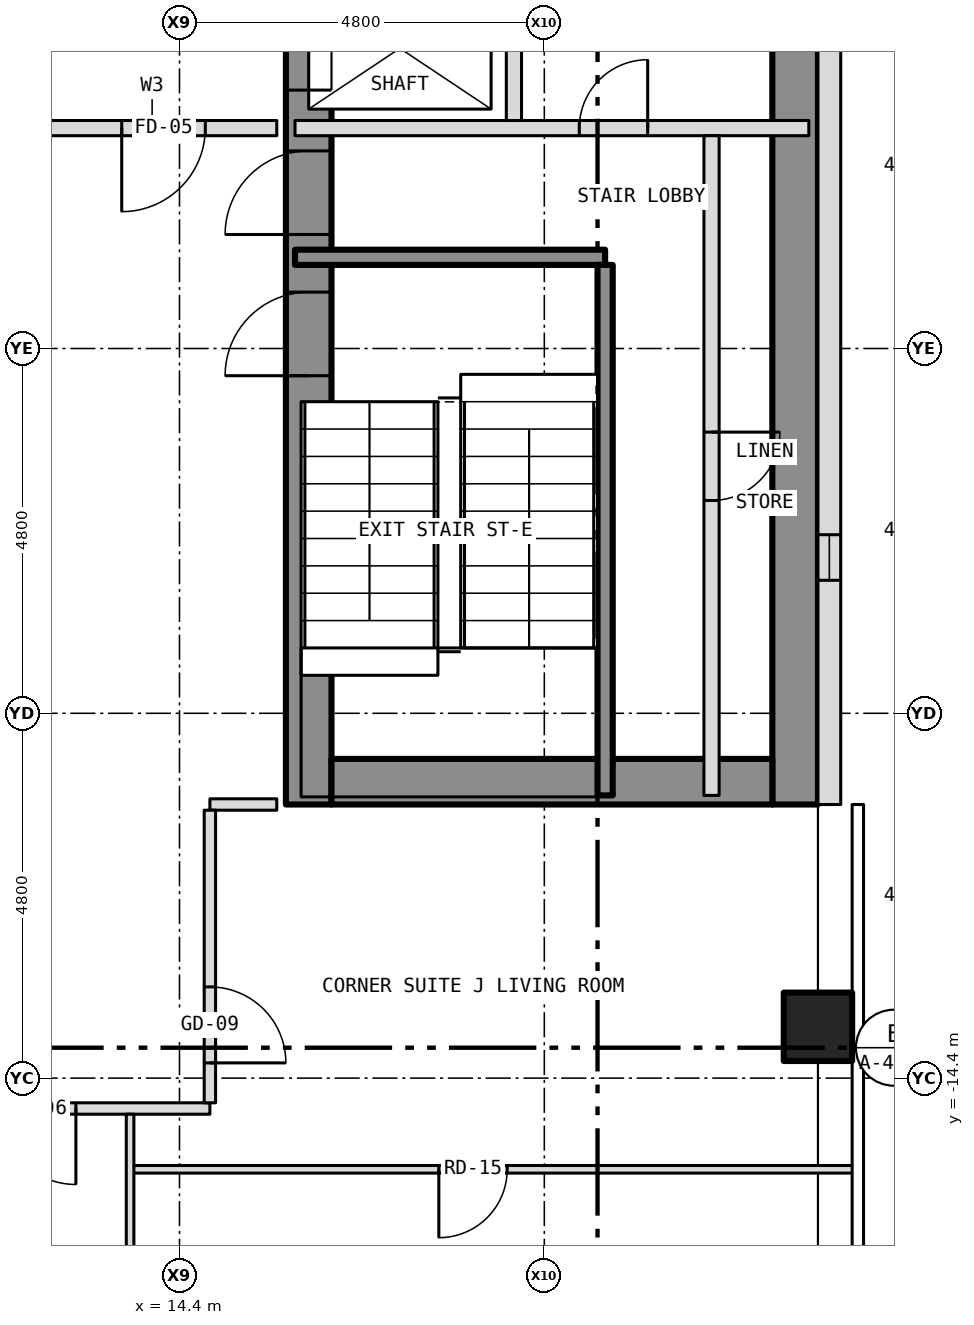
"""IFC4 building model, lengths in metres.
Left out: names, types, materials, properties, quantities, classifications, styles, units other than length and angle.
Written with IfcOpenShell. Run it as: python <this file> out.ifc"""

import sys

from ifc_helpers import new_model, si_unit, direction, frame, frame_2d, origin, origin_2d, place, context, subcontext, project, spatial, rectangle, hollow_rectangle, extrude, element, fill, save


model = new_model("IFC4")
c1 = context("Model", 3, precision=1e-05, world=origin(), true_north=direction((0.0, 1.0)))
c2 = subcontext(c1, "Body", "Model", "MODEL_VIEW")
j1 = project(units=[si_unit("LENGTHUNIT", "METRE"), si_unit("PLANEANGLEUNIT", "RADIAN")], contexts=[c1])
p1 = place(None, origin())
s1 = spatial("IfcSite", under=j1, at=p1, CompositionType="ELEMENT")
p2 = place(p1, origin())
s2 = spatial("IfcBuilding", under=s1, at=p2, CompositionType="ELEMENT")
p3 = place(p2, frame((0.0, 0.0, 99.5)))
s3 = spatial("IfcBuildingStorey", under=s2, at=p3, CompositionType="ELEMENT", Elevation=99.5)
p4 = place(p3, frame((22.8, -13.725, -0.15), z_axis=(0.0, 0.0, 1.0), x_axis=(1.0, 0.0, 0.0)))
e1 = element("IfcColumn", 1, at=p4, inside=s3, PredefinedType="COLUMN", context=c2, shape_type="SweptSolid", body=[
    extrude(hollow_rectangle(XDim=0.9, YDim=0.9, WallThickness=0.05, at=origin_2d()), origin(), (0.0, 0.0, 1.0), 3.5),
])
p5 = place(p3, frame((16.1, -10.8, 0.0), z_axis=(0.0, 0.0, 1.0), x_axis=(0.0, 1.0, 0.0)))
e2 = element("IfcWall", 2, at=p5, inside=s3, PredefinedType="SHEAR", context=c2, shape_type="SweptSolid", body=[
    extrude(rectangle(XDim=21.6, YDim=0.6, at=frame_2d((10.8, 0.0))), origin(), (0.0, 0.0, 1.0), 3.25),
])
p6 = place(p5, frame((9.4, 0.0, 0.0)))
e3 = element("IfcOpeningElement", 3, at=p6, cuts=e2, PredefinedType="OPENING", context=c2, shape_type="SweptSolid", body=[
    extrude(rectangle(XDim=1.1, YDim=2.1, at=frame_2d((0.55, 1.05))), frame((0.0, 0.312, 0.0), z_axis=(0.0, -1.0, 0.0), x_axis=(1.0, 0.0, 0.0)), (0.0, 0.0, 1.0), 0.624),
])
p7 = place(p5, frame((11.5, 0.0, 0.0)))
e4 = element("IfcOpeningElement", 4, at=p7, cuts=e2, PredefinedType="OPENING", context=c2, shape_type="SweptSolid", body=[
    extrude(rectangle(XDim=1.1, YDim=2.1, at=frame_2d((0.55, 1.05))), frame((0.0, 0.312, 0.0), z_axis=(0.0, -1.0, 0.0), x_axis=(1.0, 0.0, 0.0)), (0.0, 0.0, 1.0), 0.624),
])
p8 = place(p5, frame((13.6, 0.0, 0.0)))
e5 = element("IfcOpeningElement", 5, at=p8, cuts=e2, PredefinedType="OPENING", context=c2, shape_type="SweptSolid", body=[
    extrude(rectangle(XDim=1.1, YDim=2.1, at=frame_2d((0.55, 1.05))), frame((0.0, 0.312, 0.0), z_axis=(0.0, -1.0, 0.0), x_axis=(1.0, 0.0, 0.0)), (0.0, 0.0, 1.0), 0.624),
])
p9 = place(p5, frame((15.7, 0.0, 0.0)))
e6 = element("IfcOpeningElement", 6, at=p9, cuts=e2, PredefinedType="OPENING", context=c2, shape_type="SweptSolid", body=[
    extrude(rectangle(XDim=1.1, YDim=2.1, at=frame_2d((0.55, 1.05))), frame((0.0, 0.312, 0.0), z_axis=(0.0, -1.0, 0.0), x_axis=(1.0, 0.0, 0.0)), (0.0, 0.0, 1.0), 0.624),
])
p10 = place(p5, frame((17.8, 0.0, 0.0)))
e7 = element("IfcOpeningElement", 7, at=p10, cuts=e2, PredefinedType="OPENING", context=c2, shape_type="SweptSolid", body=[
    extrude(rectangle(XDim=1.1, YDim=2.1, at=frame_2d((0.55, 1.05))), frame((0.0, 0.312, 0.0), z_axis=(0.0, -1.0, 0.0), x_axis=(1.0, 0.0, 0.0)), (0.0, 0.0, 1.0), 0.624),
])
p11 = place(p5, frame((5.642, 0.0, 0.0)))
e8 = element("IfcOpeningElement", 8, at=p11, cuts=e2, PredefinedType="OPENING", context=c2, shape_type="SweptSolid", body=[
    extrude(rectangle(XDim=1.1, YDim=2.1, at=frame_2d((0.55, 1.05))), frame((0.0, 0.312, 0.0), z_axis=(0.0, -1.0, 0.0), x_axis=(1.0, 0.0, 0.0)), (0.0, 0.0, 1.0), 0.624),
])
p12 = place(p5, frame((7.5, 0.0, 0.0)))
e9 = element("IfcOpeningElement", 9, at=p12, cuts=e2, PredefinedType="OPENING", context=c2, shape_type="SweptSolid", body=[
    extrude(rectangle(XDim=1.1, YDim=2.1, at=frame_2d((0.55, 1.05))), frame((0.0, 0.312, 0.0), z_axis=(0.0, -1.0, 0.0), x_axis=(1.0, 0.0, 0.0)), (0.0, 0.0, 1.0), 0.624),
])
p13 = place(p3, frame((22.5, -10.8, 0.0), z_axis=(0.0, 0.0, 1.0), x_axis=(0.0, 1.0, 0.0)))
e10 = element("IfcWall", 10, at=p13, inside=s3, PredefinedType="SHEAR", context=c2, shape_type="SweptSolid", body=[
    extrude(rectangle(XDim=21.6, YDim=0.6, at=frame_2d((10.8, 0.0))), origin(), (0.0, 0.0, 1.0), 3.25),
])
p14 = place(p3, frame((16.4, -10.5, 0.0), z_axis=(0.0, 0.0, 1.0), x_axis=(1.0, 0.0, 0.0)))
e11 = element("IfcWall", 11, at=p14, inside=s3, PredefinedType="SHEAR", context=c2, shape_type="SweptSolid", body=[
    extrude(rectangle(XDim=5.8, YDim=0.6, at=frame_2d((2.9, 0.0))), origin(), (0.0, 0.0, 1.0), 3.25),
])
p15 = place(p3, frame((22.95, -10.8, 0.0), z_axis=(0.0, 0.0, 1.0), x_axis=(0.0, 1.0, 0.0)))
e12 = element("IfcWall", 12, at=p15, inside=s3, PredefinedType="SOLIDWALL", context=c2, shape_type="SweptSolid", body=[
    extrude(rectangle(XDim=21.6, YDim=0.3, at=frame_2d((10.8, 0.0))), origin(), (0.0, 0.0, 1.0), 3.5),
])
p16 = place(p15, frame((2.95, 0.0, 1.0)))
e13 = element("IfcOpeningElement", 13, at=p16, cuts=e12, PredefinedType="OPENING", context=c2, shape_type="SweptSolid", body=[
    extrude(rectangle(XDim=0.6, YDim=1.5, at=frame_2d((0.3, 0.75))), frame((0.0, 0.162, 0.0), z_axis=(0.0, -1.0, 0.0), x_axis=(1.0, 0.0, 0.0)), (0.0, 0.0, 1.0), 0.324),
])
p17 = place(p3, frame((13.75, -15.6, 0.0), z_axis=(0.0, 0.0, 1.0), x_axis=(1.0, 0.0, 0.0)))
e14 = element("IfcWall", 14, at=p17, inside=s3, PredefinedType="PARTITIONING", context=c2, shape_type="SweptSolid", body=[
    extrude(rectangle(XDim=9.53, YDim=0.1, at=frame_2d((4.765, 0.0))), origin(), (0.0, 0.0, 1.0), 3.35),
])
p18 = place(p17, frame((4.062, 0.0, 0.0)))
e15 = element("IfcOpeningElement", 15, at=p18, cuts=e14, PredefinedType="OPENING", context=c2, shape_type="SweptSolid", body=[
    extrude(rectangle(XDim=0.9, YDim=2.1, at=frame_2d((0.45, 1.05))), frame((0.0, 0.062, 0.0), z_axis=(0.0, -1.0, 0.0), x_axis=(1.0, 0.0, 0.0)), (0.0, 0.0, 1.0), 0.124),
])
p19 = place(p3, frame((-14.8, -14.8, 0.0), z_axis=(0.0, 0.0, 1.0), x_axis=(1.0, 0.0, 0.0)))
e16 = element("IfcWall", 16, at=p19, inside=s3, PredefinedType="PARTITIONING", context=c2, shape_type="SweptSolid", body=[
    extrude(rectangle(XDim=29.6, YDim=0.15, at=frame_2d((14.8, 0.0))), origin(), (0.0, 0.0, 1.0), 3.35),
])
p20 = place(p19, frame((2.634, 0.0, 0.0)))
e17 = element("IfcOpeningElement", 17, at=p20, cuts=e16, PredefinedType="OPENING", context=c2, shape_type="SweptSolid", body=[
    extrude(rectangle(XDim=1.0, YDim=2.1, at=frame_2d((0.5, 1.05))), frame((0.0, 0.087, 0.0), z_axis=(0.0, -1.0, 0.0), x_axis=(1.0, 0.0, 0.0)), (0.0, 0.0, 1.0), 0.174),
])
p21 = place(p19, frame((16.816, 0.0, 0.0)))
e18 = element("IfcOpeningElement", 18, at=p21, cuts=e16, PredefinedType="OPENING", context=c2, shape_type="SweptSolid", body=[
    extrude(rectangle(XDim=1.0, YDim=2.1, at=frame_2d((0.5, 1.05))), frame((0.0, 0.087, 0.0), z_axis=(0.0, -1.0, 0.0), x_axis=(1.0, 0.0, 0.0)), (0.0, 0.0, 1.0), 0.174),
])
p22 = place(p19, frame((22.263, 0.0, 0.0)))
e19 = element("IfcOpeningElement", 19, at=p22, cuts=e16, PredefinedType="OPENING", context=c2, shape_type="SweptSolid", body=[
    extrude(rectangle(XDim=1.0, YDim=2.1, at=frame_2d((0.5, 1.05))), frame((0.0, 0.087, 0.0), z_axis=(0.0, -1.0, 0.0), x_axis=(1.0, 0.0, 0.0)), (0.0, 0.0, 1.0), 0.174),
])
p23 = place(p19, frame((26.837, 0.0, 0.0)))
e20 = element("IfcOpeningElement", 20, at=p23, cuts=e16, PredefinedType="OPENING", context=c2, shape_type="SweptSolid", body=[
    extrude(rectangle(XDim=1.0, YDim=2.1, at=frame_2d((0.5, 1.05))), frame((0.0, 0.087, 0.0), z_axis=(0.0, -1.0, 0.0), x_axis=(1.0, 0.0, 0.0)), (0.0, 0.0, 1.0), 0.174),
])
p24 = place(p3, frame((14.8, -10.8, 0.0), z_axis=(0.0, 0.0, 1.0), x_axis=(1.0, 0.0, 0.0)))
e21 = element("IfcWall", 21, at=p24, inside=s3, PredefinedType="PARTITIONING", context=c2, shape_type="SweptSolid", body=[
    extrude(rectangle(XDim=0.88, YDim=0.15, at=frame_2d((0.44, 0.0))), origin(), (0.0, 0.0, 1.0), 3.35),
])
p25 = place(p3, frame((15.92, -3.6, 0.0), z_axis=(0.0, 0.0, 1.0), x_axis=(1.0, 0.0, 0.0)))
e22 = element("IfcWall", 22, at=p25, inside=s3, PredefinedType="SHEAR", context=c2, shape_type="SweptSolid", body=[
    extrude(rectangle(XDim=4.08, YDim=0.2, at=frame_2d((2.04, 0.0))), origin(), (0.0, 0.0, 1.0), 3.25),
])
p26 = place(p3, frame((12.4, -1.9, 0.0), z_axis=(0.0, 0.0, 1.0), x_axis=(1.0, 0.0, 0.0)))
e23 = element("IfcWall", 23, at=p26, inside=s3, PredefinedType="PARTITIONING", context=c2, shape_type="SweptSolid", body=[
    extrude(rectangle(XDim=3.28, YDim=0.2, at=frame_2d((1.64, 0.0))), origin(), (0.0, 0.0, 1.0), 3.35),
])
p27 = place(p26, frame((1.24, 0.0, 0.0)))
e24 = element("IfcOpeningElement", 24, at=p27, cuts=e23, PredefinedType="OPENING", context=c2, shape_type="SweptSolid", body=[
    extrude(rectangle(XDim=1.1, YDim=2.1, at=frame_2d((0.55, 1.05))), frame((0.0, 0.112, 0.0), z_axis=(0.0, -1.0, 0.0), x_axis=(1.0, 0.0, 0.0)), (0.0, 0.0, 1.0), 0.224),
])
p28 = place(p3, frame((15.92, -1.9, 0.0), z_axis=(0.0, 0.0, 1.0), x_axis=(1.0, 0.0, 0.0)))
e25 = element("IfcWall", 25, at=p28, inside=s3, PredefinedType="PARTITIONING", context=c2, shape_type="SweptSolid", body=[
    extrude(rectangle(XDim=6.76, YDim=0.2, at=frame_2d((3.38, 0.0))), origin(), (0.0, 0.0, 1.0), 3.25),
])
p29 = place(p28, frame((3.74, 0.0, 0.0)))
e26 = element("IfcOpeningElement", 26, at=p29, cuts=e25, PredefinedType="OPENING", context=c2, shape_type="SweptSolid", body=[
    extrude(rectangle(XDim=0.9, YDim=2.1, at=frame_2d((0.45, 1.05))), frame((0.0, 0.112, 0.0), z_axis=(0.0, -1.0, 0.0), x_axis=(1.0, 0.0, 0.0)), (0.0, 0.0, 1.0), 0.224),
])
p30 = place(p3, frame((13.75, -22.68, 0.0), z_axis=(0.0, 0.0, 1.0), x_axis=(0.0, 1.0, 0.0)))
e27 = element("IfcWall", 27, at=p30, inside=s3, PredefinedType="PARTITIONING", context=c2, shape_type="SweptSolid", body=[
    extrude(rectangle(XDim=7.805, YDim=0.1, at=frame_2d((3.902, 0.0))), origin(), (0.0, 0.0, 1.0), 3.35),
])
p31 = place(p3, frame((14.8, -14.725, 0.0), z_axis=(0.0, 0.0, 1.0), x_axis=(0.0, 1.0, 0.0)))
e28 = element("IfcWall", 28, at=p31, inside=s3, PredefinedType="PARTITIONING", context=c2, shape_type="SweptSolid", body=[
    extrude(rectangle(XDim=3.85, YDim=0.15, at=frame_2d((1.925, 0.0))), origin(), (0.0, 0.0, 1.0), 3.35),
])
p32 = place(p31, frame((0.525, 0.0, 0.0)))
e29 = element("IfcOpeningElement", 29, at=p32, cuts=e28, PredefinedType="OPENING", context=c2, shape_type="SweptSolid", body=[
    extrude(rectangle(XDim=1.0, YDim=2.1, at=frame_2d((0.5, 1.05))), frame((0.0, 0.087, 0.0), z_axis=(0.0, -1.0, 0.0), x_axis=(1.0, 0.0, 0.0)), (0.0, 0.0, 1.0), 0.174),
])
p33 = place(p3, frame((18.8, -1.8, 0.0), z_axis=(0.0, 0.0, 1.0), x_axis=(0.0, 1.0, 0.0)))
e30 = element("IfcWall", 30, at=p33, inside=s3, PredefinedType="PARTITIONING", context=c2, shape_type="SweptSolid", body=[
    extrude(rectangle(XDim=4.0, YDim=0.2, at=frame_2d((2.0, 0.0))), origin(), (0.0, 0.0, 1.0), 3.25),
])
p34 = place(p3, frame((20.0, -10.68, 0.0), z_axis=(0.0, 0.0, 1.0), x_axis=(0.0, 1.0, 0.0)))
e31 = element("IfcWall", 31, at=p34, inside=s3, PredefinedType="SHEAR", context=c2, shape_type="SweptSolid", body=[
    extrude(rectangle(XDim=6.98, YDim=0.2, at=frame_2d((3.49, 0.0))), origin(), (0.0, 0.0, 1.0), 3.25),
])
p35 = place(p3, frame((21.4, -10.68, 0.0), z_axis=(0.0, 0.0, 1.0), x_axis=(0.0, 1.0, 0.0)))
e32 = element("IfcWall", 32, at=p35, inside=s3, PredefinedType="PARTITIONING", context=c2, shape_type="SweptSolid", body=[
    extrude(rectangle(XDim=8.68, YDim=0.2, at=frame_2d((4.34, 0.0))), origin(), (0.0, 0.0, 1.0), 3.25),
])
p36 = place(p35, frame((3.88, 0.0, 0.0)))
e33 = element("IfcOpeningElement", 33, at=p36, cuts=e32, PredefinedType="OPENING", context=c2, shape_type="SweptSolid", body=[
    extrude(rectangle(XDim=0.9, YDim=2.1, at=frame_2d((0.45, 1.05))), frame((0.0, 0.112, 0.0), z_axis=(0.0, -1.0, 0.0), x_axis=(1.0, 0.0, 0.0)), (0.0, 0.0, 1.0), 0.224),
])
p37 = place(p16, origin())
e34 = element("IfcWindow", 34, at=p37, inside=s3, PartitioningType="SINGLE_PANEL", PredefinedType="WINDOW", context=c2, shape_type="SweptSolid", body=[
    extrude(rectangle(XDim=0.6, YDim=1.5, at=frame_2d((0.3, 0.75))), frame((0.0, -0.06, 0.0), z_axis=(0.0, -1.0, 0.0), x_axis=(1.0, 0.0, 0.0)), (0.0, 0.0, 1.0), 0.06),
])
fill(e13, e34)
p38 = place(p6, origin())
e35 = element("IfcDoor", 35, at=p38, inside=s3, OperationType="SLIDING_TO_LEFT", PredefinedType="DOOR", context=c2, shape_type="SweptSolid", body=[
    extrude(rectangle(XDim=1.1, YDim=2.1, at=frame_2d((0.55, 1.05))), frame((0.0, 0.025, 0.0), z_axis=(0.0, -1.0, 0.0), x_axis=(1.0, 0.0, 0.0)), (0.0, 0.0, 1.0), 0.05),
])
fill(e3, e35)
p39 = place(p11, origin())
e36 = element("IfcDoor", 36, at=p39, inside=s3, OperationType="SINGLE_SWING_LEFT", PredefinedType="DOOR", context=c2, shape_type="SweptSolid", body=[
    extrude(rectangle(XDim=1.1, YDim=2.1, at=frame_2d((0.55, 1.05))), frame((0.0, 0.025, 0.0), z_axis=(0.0, -1.0, 0.0), x_axis=(1.0, 0.0, 0.0)), (0.0, 0.0, 1.0), 0.05),
])
fill(e8, e36)
p40 = place(p12, origin())
e37 = element("IfcDoor", 37, at=p40, inside=s3, OperationType="SINGLE_SWING_LEFT", PredefinedType="DOOR", context=c2, shape_type="SweptSolid", body=[
    extrude(rectangle(XDim=1.1, YDim=2.1, at=frame_2d((0.55, 1.05))), frame((0.0, 0.025, 0.0), z_axis=(0.0, -1.0, 0.0), x_axis=(1.0, 0.0, 0.0)), (0.0, 0.0, 1.0), 0.05),
])
fill(e9, e37)
p41 = place(p36, origin())
e38 = element("IfcDoor", 38, at=p41, inside=s3, OperationType="SINGLE_SWING_RIGHT", PredefinedType="DOOR", context=c2, shape_type="SweptSolid", body=[
    extrude(rectangle(XDim=0.9, YDim=2.1, at=frame_2d((0.45, 1.05))), frame((0.0, 0.025, 0.0), z_axis=(0.0, -1.0, 0.0), x_axis=(1.0, 0.0, 0.0)), (0.0, 0.0, 1.0), 0.05),
])
fill(e33, e38)
p42 = place(p29, origin())
e39 = element("IfcDoor", 39, at=p42, inside=s3, OperationType="SINGLE_SWING_RIGHT", PredefinedType="DOOR", context=c2, shape_type="SweptSolid", body=[
    extrude(rectangle(XDim=0.9, YDim=2.1, at=frame_2d((0.45, 1.05))), frame((0.0, 0.025, 0.0), z_axis=(0.0, -1.0, 0.0), x_axis=(1.0, 0.0, 0.0)), (0.0, 0.0, 1.0), 0.05),
])
fill(e26, e39)
p43 = place(p27, origin())
e40 = element("IfcDoor", 40, at=p43, inside=s3, OperationType="SINGLE_SWING_LEFT", PredefinedType="DOOR", context=c2, shape_type="SweptSolid", body=[
    extrude(rectangle(XDim=1.1, YDim=2.1, at=frame_2d((0.55, 1.05))), frame((0.0, 0.025, 0.0), z_axis=(0.0, -1.0, 0.0), x_axis=(1.0, 0.0, 0.0)), (0.0, 0.0, 1.0), 0.05),
])
fill(e24, e40)
p44 = place(p23, origin())
e41 = element("IfcDoor", 41, at=p44, inside=s3, OperationType="SINGLE_SWING_RIGHT", PredefinedType="DOOR", context=c2, shape_type="SweptSolid", body=[
    extrude(rectangle(XDim=1.0, YDim=2.1, at=frame_2d((0.5, 1.05))), frame((0.0, 0.025, 0.0), z_axis=(0.0, -1.0, 0.0), x_axis=(1.0, 0.0, 0.0)), (0.0, 0.0, 1.0), 0.05),
])
fill(e20, e41)
p45 = place(p32, origin())
e42 = element("IfcDoor", 42, at=p45, inside=s3, OperationType="SINGLE_SWING_LEFT", PredefinedType="DOOR", context=c2, shape_type="SweptSolid", body=[
    extrude(rectangle(XDim=1.0, YDim=2.1, at=frame_2d((0.5, 1.05))), frame((0.0, 0.025, 0.0), z_axis=(0.0, -1.0, 0.0), x_axis=(1.0, 0.0, 0.0)), (0.0, 0.0, 1.0), 0.05),
])
fill(e29, e42)
p46 = place(p18, origin())
e43 = element("IfcDoor", 43, at=p46, inside=s3, OperationType="SINGLE_SWING_LEFT", PredefinedType="DOOR", context=c2, shape_type="SweptSolid", body=[
    extrude(rectangle(XDim=0.9, YDim=2.1, at=frame_2d((0.45, 1.05))), frame((0.0, 0.025, 0.0), z_axis=(0.0, -1.0, 0.0), x_axis=(1.0, 0.0, 0.0)), (0.0, 0.0, 1.0), 0.05),
])
fill(e15, e43)
save(model, sys.argv[1])
